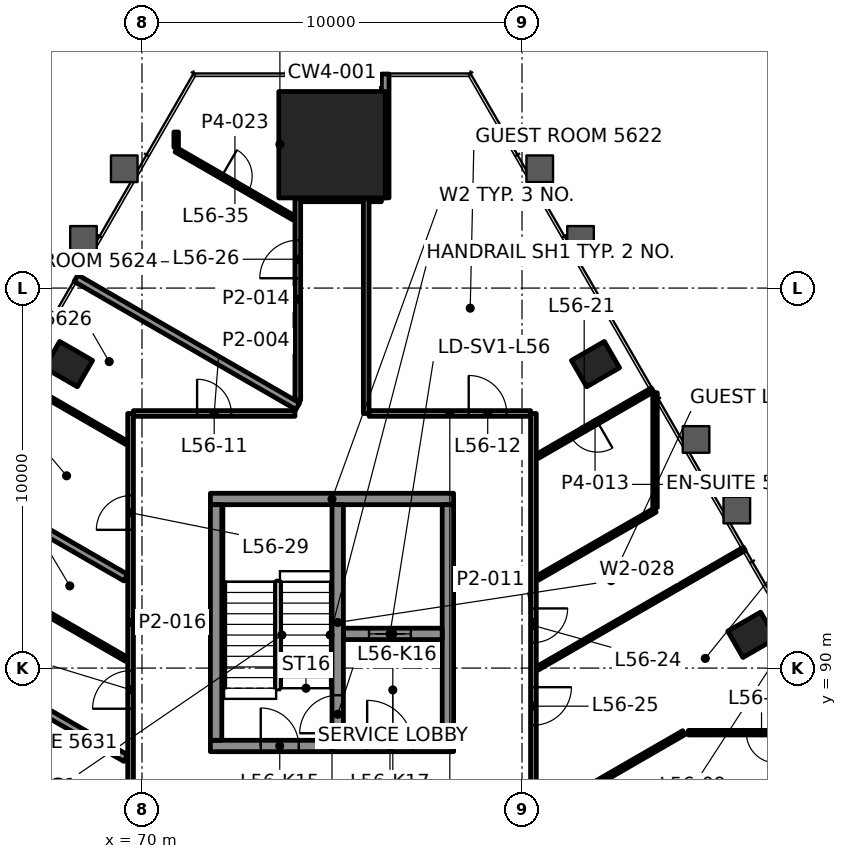
"""IFC4 building model, lengths in metres.
Left out: names, types, materials, properties, quantities, classifications, styles, units other than length and angle.
Written with IfcOpenShell. Run it as: python <this file> out.ifc"""

import sys

from ifc_helpers import new_model, si_unit, direction, frame, frame_2d, origin, origin_2d, place, context, subcontext, project, spatial, rectangle, hollow_rectangle, extrude, element, fill, save


model = new_model("IFC4")
c1 = context("Model", 3, precision=1e-05, world=origin(), true_north=direction((0.0, 1.0)))
c2 = subcontext(c1, "Body", "Model", "MODEL_VIEW")
j1 = project(units=[si_unit("LENGTHUNIT", "METRE"), si_unit("PLANEANGLEUNIT", "RADIAN")], contexts=[c1])
p1 = place(None, origin())
s1 = spatial("IfcSite", under=j1, at=p1, CompositionType="ELEMENT")
p2 = place(p1, origin())
s2 = spatial("IfcBuilding", under=s1, at=p2, CompositionType="ELEMENT")
p3 = place(p2, frame((0.0, 0.0, 237.7)))
s3 = spatial("IfcBuildingStorey", under=s2, at=p3, CompositionType="ELEMENT", Elevation=237.7)
p4 = place(p3, frame((75.0, 103.773, 0.0), z_axis=(0.0, 0.0, 1.0), x_axis=(-1.0, 0.0, 0.0)))
e1 = element("IfcColumn", 1, at=p4, inside=s3, PredefinedType="COLUMN", context=c2, shape_type="SweptSolid", body=[
    extrude(rectangle(XDim=2.8, YDim=2.8, at=origin_2d()), origin(), (0.0, 0.0, 1.0), 3.9),
])
for number, where, z_axis, x_axis in (
    (2, (86.046, 90.875, -0.0), (0.0, 0.0, 1.0), (-0.5, 0.866, 0.0)),
    (3, (81.933, 97.999, -0.0), (0.0, 0.0, 1.0), (-0.5, 0.866, 0.0)),
    (4, (68.067, 97.999, -0.0), (0.0, 0.0, 1.0), (-0.5, -0.866, 0.0)),
):
    element("IfcColumn", number, at=place(p3, frame(where, z_axis=z_axis, x_axis=x_axis)), inside=s3, PredefinedType="COLUMN", context=c2, shape_type="SweptSolid", body=[
        extrude(hollow_rectangle(XDim=0.8, YDim=1.0, WallThickness=0.05, at=origin_2d()), origin(), (0.0, 0.0, 1.0), 3.9),
    ])
p5 = place(p3, frame((71.8, 87.95, 0.0), z_axis=(0.0, 0.0, 1.0), x_axis=(1.0, 0.0, 0.0)))
e5 = element("IfcWall", 5, at=p5, inside=s3, PredefinedType="SHEAR", context=c2, shape_type="SweptSolid", body=[
    extrude(rectangle(XDim=6.4, YDim=0.3, at=frame_2d((3.2, 0.0))), origin(), (0.0, 0.0, 1.0), 3.6),
])
p6 = place(p5, frame((1.325, 0.0, 0.0)))
e6 = element("IfcOpeningElement", 6, at=p6, cuts=e5, PredefinedType="OPENING", context=c2, shape_type="SweptSolid", body=[
    extrude(rectangle(XDim=1.0, YDim=2.1, at=frame_2d((0.5, 1.05))), frame((0.0, 0.16, 0.0), z_axis=(0.0, -1.0, 0.0), x_axis=(1.0, 0.0, 0.0)), (0.0, 0.0, 1.0), 0.32),
])
p7 = place(p5, frame((4.125, 0.0, 0.0)))
e7 = element("IfcOpeningElement", 7, at=p7, cuts=e5, PredefinedType="OPENING", context=c2, shape_type="SweptSolid", body=[
    extrude(rectangle(XDim=1.2, YDim=2.1, at=frame_2d((0.6, 1.05))), frame((0.0, 0.16, 0.0), z_axis=(0.0, -1.0, 0.0), x_axis=(1.0, 0.0, 0.0)), (0.0, 0.0, 1.0), 0.32),
])
p8 = place(p3, frame((71.8, 94.45, 0.0), z_axis=(0.0, 0.0, 1.0), x_axis=(1.0, 0.0, 0.0)))
e8 = element("IfcWall", 8, at=p8, inside=s3, PredefinedType="SHEAR", context=c2, shape_type="SweptSolid", body=[
    extrude(rectangle(XDim=6.4, YDim=0.3, at=frame_2d((3.2, 0.0))), origin(), (0.0, 0.0, 1.0), 3.6),
])
for number, where, z_axis, x_axis in (
    (9, (71.95, 88.1, 0.0), (0.0, 0.0, 1.0), (0.0, 1.0, 0.0)),
    (10, (78.05, 88.1, 0.0), (0.0, 0.0, 1.0), (0.0, 1.0, 0.0)),
):
    element("IfcWall", number, at=place(p3, frame(where, z_axis=z_axis, x_axis=x_axis)), inside=s3, PredefinedType="SHEAR", context=c2, shape_type="SweptSolid", body=[
        extrude(rectangle(XDim=6.2, YDim=0.3, at=frame_2d((3.1, 0.0))), origin(), (0.0, 0.0, 1.0), 3.6),
    ])
p9 = place(p3, frame((75.3, 90.9, 0.0), z_axis=(0.0, 0.0, 1.0), x_axis=(1.0, 0.0, 0.0)))
e11 = element("IfcWall", 11, at=p9, inside=s3, PredefinedType="SHEAR", context=c2, shape_type="SweptSolid", body=[
    extrude(rectangle(XDim=2.6, YDim=0.3, at=frame_2d((1.3, 0.0))), origin(), (0.0, 0.0, 1.0), 3.6),
])
p10 = place(p9, frame((0.675, 0.0, 0.0)))
e12 = element("IfcOpeningElement", 12, at=p10, cuts=e11, PredefinedType="OPENING", context=c2, shape_type="SweptSolid", body=[
    extrude(rectangle(XDim=1.1, YDim=2.1, at=frame_2d((0.55, 1.05))), frame((0.0, 0.16, 0.0), z_axis=(0.0, -1.0, 0.0), x_axis=(1.0, 0.0, 0.0)), (0.0, 0.0, 1.0), 0.32),
])
p11 = place(p3, frame((75.15, 88.1, 0.0), z_axis=(0.0, 0.0, 1.0), x_axis=(0.0, 1.0, 0.0)))
e13 = element("IfcWall", 13, at=p11, inside=s3, PredefinedType="SHEAR", context=c2, shape_type="SweptSolid", body=[
    extrude(rectangle(XDim=6.2, YDim=0.3, at=frame_2d((3.1, 0.0))), origin(), (0.0, 0.0, 1.0), 3.6),
])
p12 = place(p11, frame((0.185, 0.0, 0.0)))
e14 = element("IfcOpeningElement", 14, at=p12, cuts=e13, PredefinedType="OPENING", context=c2, shape_type="SweptSolid", body=[
    extrude(rectangle(XDim=1.0, YDim=2.1, at=frame_2d((0.5, 1.05))), frame((0.0, 0.16, 0.0), z_axis=(0.0, -1.0, 0.0), x_axis=(1.0, 0.0, 0.0)), (0.0, 0.0, 1.0), 0.32),
])
p13 = place(p3, frame((88.642, 88.3, 0.0), z_axis=(0.0, 0.0, 1.0), x_axis=(-1.0, 0.0, 0.0)))
e15 = element("IfcWall", 15, at=p13, inside=s3, PredefinedType="PARTITIONING", context=c2, shape_type="SweptSolid", body=[
    extrude(rectangle(XDim=4.263, YDim=0.12, at=frame_2d((2.132, 0.0))), origin(), (0.0, 0.0, 1.0), 2.922),
])
p14 = place(p13, frame((1.939, 0.0, 0.0)))
e16 = element("IfcOpeningElement", 16, at=p14, cuts=e15, PredefinedType="OPENING", context=c2, shape_type="SweptSolid", body=[
    extrude(rectangle(XDim=0.8, YDim=2.1, at=frame_2d((0.4, 1.05))), frame((0.0, 0.07, 0.0), z_axis=(0.0, -1.0, 0.0), x_axis=(1.0, 0.0, 0.0)), (0.0, 0.0, 1.0), 0.14),
])
p15 = place(p3, frame((69.775, 96.7, 0.0), z_axis=(0.0, 0.0, 1.0), x_axis=(1.0, 0.0, 0.0)))
e17 = element("IfcWall", 17, at=p15, inside=s3, PredefinedType="PARTITIONING", context=c2, shape_type="SweptSolid", body=[
    extrude(rectangle(XDim=4.25, YDim=0.15, at=frame_2d((2.125, 0.0))), origin(), (0.0, 0.0, 1.0), 3.0),
])
p16 = place(p15, frame((1.675, 0.0, 0.0)))
e18 = element("IfcOpeningElement", 18, at=p16, cuts=e17, PredefinedType="OPENING", context=c2, shape_type="SweptSolid", body=[
    extrude(rectangle(XDim=0.9, YDim=2.1, at=frame_2d((0.45, 1.05))), frame((0.0, 0.085, 0.0), z_axis=(0.0, -1.0, 0.0), x_axis=(1.0, 0.0, 0.0)), (0.0, 0.0, 1.0), 0.17),
])
p17 = place(p3, frame((75.975, 96.7, 0.0), z_axis=(0.0, 0.0, 1.0), x_axis=(1.0, 0.0, 0.0)))
e19 = element("IfcWall", 19, at=p17, inside=s3, PredefinedType="PARTITIONING", context=c2, shape_type="SweptSolid", body=[
    extrude(rectangle(XDim=4.25, YDim=0.15, at=frame_2d((2.125, 0.0))), origin(), (0.0, 0.0, 1.0), 3.0),
])
p18 = place(p17, frame((2.622, 0.0, 0.0)))
e20 = element("IfcOpeningElement", 20, at=p18, cuts=e19, PredefinedType="OPENING", context=c2, shape_type="SweptSolid", body=[
    extrude(rectangle(XDim=1.0, YDim=2.1, at=frame_2d((0.5, 1.05))), frame((0.0, 0.085, 0.0), z_axis=(0.0, -1.0, 0.0), x_axis=(1.0, 0.0, 0.0)), (0.0, 0.0, 1.0), 0.17),
])
p19 = place(p3, frame((74.176, 102.373, 0.0), z_axis=(0.0, 0.0, 1.0), x_axis=(1.0, 0.0, 0.0)))
e21 = element("IfcWall", 21, at=p19, inside=s3, PredefinedType="PARTITIONING", context=c2, shape_type="SweptSolid", body=[
    extrude(rectangle(XDim=1.649, YDim=0.2, at=frame_2d((0.825, 0.0))), origin(), (0.0, 0.0, 1.0), 2.997),
])
p20 = place(p3, frame((84.493, 85.23, 0.0), z_axis=(0.0, 0.0, 1.0), x_axis=(0.866034146242, 0.499984857314, 0.0)))
e22 = element("IfcWall", 22, at=p20, inside=s3, PredefinedType="PARTITIONING", context=c2, shape_type="SweptSolid", body=[
    extrude(rectangle(XDim=5.128, YDim=0.12, at=frame_2d((2.564, 0.0))), origin(), (0.0, 0.0, 1.0), 2.922),
])
p21 = place(p3, frame((80.41, 86.078, 0.0), z_axis=(0.0, 0.0, 1.0), x_axis=(0.866033721197, 0.499985593543, 0.0)))
e23 = element("IfcWall", 23, at=p21, inside=s3, PredefinedType="PARTITIONING", context=c2, shape_type="SweptSolid", body=[
    extrude(rectangle(XDim=4.444, YDim=0.12, at=frame_2d((2.222, 0.0))), origin(), (0.0, 0.0, 1.0), 3.0),
])
p22 = place(p3, frame((80.401, 89.991, 0.0), z_axis=(0.0, 0.0, 1.0), x_axis=(0.86602790099, 0.499995674689, 0.0)))
e24 = element("IfcWall", 24, at=p22, inside=s3, PredefinedType="PARTITIONING", context=c2, shape_type="SweptSolid", body=[
    extrude(rectangle(XDim=6.291, YDim=0.1, at=frame_2d((3.146, 0.0))), origin(), (0.0, 0.0, 1.0), 2.922),
])
p23 = place(p3, frame((80.41, 92.37, 0.0), z_axis=(0.0, 0.0, 1.0), x_axis=(0.866028357664, 0.499994883695, 0.0)))
e25 = element("IfcWall", 25, at=p23, inside=s3, PredefinedType="PARTITIONING", context=c2, shape_type="SweptSolid", body=[
    extrude(rectangle(XDim=3.568, YDim=0.12, at=frame_2d((1.784, 0.0))), origin(), (0.0, 0.0, 1.0), 3.0),
])
p24 = place(p3, frame((83.433, 97.321, 0.0), z_axis=(0.0, 0.0, 1.0), x_axis=(-0.866022549299, -0.50000494408, 0.0)))
e26 = element("IfcWall", 26, at=p24, inside=s3, PredefinedType="PARTITIONING", context=c2, shape_type="SweptSolid", body=[
    extrude(rectangle(XDim=3.491, YDim=0.12, at=frame_2d((1.746, 0.0))), origin(), (0.0, 0.0, 1.0), 2.922),
])
p25 = place(p24, frame((1.676, 0.0, 0.0)))
e27 = element("IfcOpeningElement", 27, at=p25, cuts=e26, PredefinedType="OPENING", context=c2, shape_type="SweptSolid", body=[
    extrude(rectangle(XDim=0.8, YDim=2.1, at=frame_2d((0.4, 1.05))), frame((0.0, 0.07, 0.0), z_axis=(0.0, -1.0, 0.0), x_axis=(1.0, 0.0, 0.0)), (0.0, 0.0, 1.0), 0.14),
])
p26 = place(p3, frame((83.5, 94.224, 0.0), z_axis=(0.0, 0.0, 1.0), x_axis=(0.0, 1.0, 0.0)))
e28 = element("IfcWall", 28, at=p26, inside=s3, PredefinedType="PARTITIONING", context=c2, shape_type="SweptSolid", body=[
    extrude(rectangle(XDim=3.022, YDim=0.12, at=frame_2d((1.511, 0.0))), origin(), (0.0, 0.0, 1.0), 2.922),
])
p27 = place(p3, frame((80.3, 96.699, 0.0), z_axis=(0.0, 0.0, 1.0), x_axis=(0.0, -1.0, 0.0)))
e29 = element("IfcWall", 29, at=p27, inside=s3, PredefinedType="PARTITIONING", context=c2, shape_type="SweptSolid", body=[
    extrude(rectangle(XDim=10.999, YDim=0.15, at=frame_2d((5.5, 0.0))), origin(), (0.0, 0.0, 1.0), 3.0),
])
p28 = place(p27, frame((5.129, 0.0, 0.0)))
e30 = element("IfcOpeningElement", 30, at=p28, cuts=e29, PredefinedType="OPENING", context=c2, shape_type="SweptSolid", body=[
    extrude(rectangle(XDim=0.9, YDim=2.1, at=frame_2d((0.45, 1.05))), frame((0.0, 0.085, 0.0), z_axis=(0.0, -1.0, 0.0), x_axis=(1.0, 0.0, 0.0)), (0.0, 0.0, 1.0), 0.17),
])
p29 = place(p27, frame((7.202, 0.0, 0.0)))
e31 = element("IfcOpeningElement", 31, at=p29, cuts=e29, PredefinedType="OPENING", context=c2, shape_type="SweptSolid", body=[
    extrude(rectangle(XDim=1.0, YDim=2.1, at=frame_2d((0.5, 1.05))), frame((0.0, 0.085, 0.0), z_axis=(0.0, -1.0, 0.0), x_axis=(1.0, 0.0, 0.0)), (0.0, 0.0, 1.0), 0.17),
])
p30 = place(p3, frame((76.4, 102.373, 0.0), z_axis=(0.0, 0.0, 1.0), x_axis=(0.0, 1.0, 0.0)))
e32 = element("IfcWall", 32, at=p30, inside=s3, PredefinedType="PARTITIONING", context=c2, shape_type="SweptSolid", body=[
    extrude(rectangle(XDim=3.26, YDim=0.2, at=frame_2d((1.63, 0.0))), origin(), (0.0, 0.0, 1.0), 3.0),
])
p31 = place(p3, frame((75.9, 96.7, 0.0), z_axis=(0.0, 0.0, 1.0), x_axis=(0.0, 1.0, 0.0)))
e33 = element("IfcWall", 33, at=p31, inside=s3, PredefinedType="PARTITIONING", context=c2, shape_type="SweptSolid", body=[
    extrude(rectangle(XDim=5.673, YDim=0.15, at=frame_2d((2.836, 0.0))), origin(), (0.0, 0.0, 1.0), 3.0),
])
p32 = place(p3, frame((74.1, 97.05, 0.0), z_axis=(0.0, 0.0, 1.0), x_axis=(0.0, 1.0, 0.0)))
e34 = element("IfcWall", 34, at=p32, inside=s3, PredefinedType="PARTITIONING", context=c2, shape_type="SweptSolid", body=[
    extrude(rectangle(XDim=5.322, YDim=0.15, at=frame_2d((2.661, 0.0))), origin(), (0.0, 0.0, 1.0), 3.0),
])
p33 = place(p32, frame((3.209, 0.0, 0.0)))
e35 = element("IfcOpeningElement", 35, at=p33, cuts=e34, PredefinedType="OPENING", context=c2, shape_type="SweptSolid", body=[
    extrude(rectangle(XDim=1.0, YDim=2.1, at=frame_2d((0.5, 1.05))), frame((0.0, 0.085, 0.0), z_axis=(0.0, -1.0, 0.0), x_axis=(1.0, 0.0, 0.0)), (0.0, 0.0, 1.0), 0.17),
])
p34 = place(p3, frame((70.9, 103.703, 0.0), z_axis=(0.0, 0.0, 1.0), x_axis=(0.0, 1.0, 0.0)))
e36 = element("IfcWall", 36, at=p34, inside=s3, PredefinedType="PARTITIONING", context=c2, shape_type="SweptSolid", body=[
    extrude(rectangle(XDim=0.403, YDim=0.12, at=frame_2d((0.202, 0.0))), origin(), (0.0, 0.0, 1.0), 3.0),
])
p35 = place(p3, frame((69.7, 85.7, 0.0), z_axis=(0.0, 0.0, 1.0), x_axis=(0.0, 1.0, 0.0)))
e37 = element("IfcWall", 37, at=p35, inside=s3, PredefinedType="PARTITIONING", context=c2, shape_type="SweptSolid", body=[
    extrude(rectangle(XDim=10.999, YDim=0.15, at=frame_2d((5.5, 0.0))), origin(), (0.0, 0.0, 1.0), 3.0),
])
p36 = place(p35, frame((3.23, 0.0, 0.0)))
e38 = element("IfcOpeningElement", 38, at=p36, cuts=e37, PredefinedType="OPENING", context=c2, shape_type="SweptSolid", body=[
    extrude(rectangle(XDim=1.0, YDim=2.1, at=frame_2d((0.5, 1.05))), frame((0.0, 0.085, 0.0), z_axis=(0.0, -1.0, 0.0), x_axis=(1.0, 0.0, 0.0)), (0.0, 0.0, 1.0), 0.17),
])
p37 = place(p35, frame((7.938, 0.0, 0.0)))
e39 = element("IfcOpeningElement", 39, at=p37, cuts=e37, PredefinedType="OPENING", context=c2, shape_type="SweptSolid", body=[
    extrude(rectangle(XDim=0.9, YDim=2.1, at=frame_2d((0.45, 1.05))), frame((0.0, 0.085, 0.0), z_axis=(0.0, -1.0, 0.0), x_axis=(1.0, 0.0, 0.0)), (0.0, 0.0, 1.0), 0.17),
])
p38 = place(p3, frame((70.9, 103.634, 0.0), z_axis=(0.0, 0.0, 1.0), x_axis=(0.866028357664, -0.499994883695, 0.0)))
e40 = element("IfcWall", 40, at=p38, inside=s3, PredefinedType="PARTITIONING", context=c2, shape_type="SweptSolid", body=[
    extrude(rectangle(XDim=3.568, YDim=0.12, at=frame_2d((1.784, 0.0))), origin(), (0.0, 0.0, 1.0), 3.0),
])
p39 = place(p38, frame((1.384, 0.0, 0.0)))
e41 = element("IfcOpeningElement", 41, at=p39, cuts=e40, PredefinedType="OPENING", context=c2, shape_type="SweptSolid", body=[
    extrude(rectangle(XDim=0.8, YDim=2.1, at=frame_2d((0.4, 1.05))), frame((0.0, 0.07, 0.0), z_axis=(0.0, -1.0, 0.0), x_axis=(1.0, 0.0, 0.0)), (0.0, 0.0, 1.0), 0.14),
])
p40 = place(p3, frame((74.1, 96.89, 0.0), z_axis=(0.0, 0.0, 1.0), x_axis=(-0.866036585879, 0.499980631543, 0.0)))
e42 = element("IfcWall", 42, at=p40, inside=s3, PredefinedType="PARTITIONING", context=c2, shape_type="SweptSolid", body=[
    extrude(rectangle(XDim=6.74, YDim=0.2, at=frame_2d((3.37, 0.0))), origin(), (0.0, 0.0, 1.0), 3.0),
])
p41 = place(p3, frame((69.599, 95.927, 0.0), z_axis=(0.0, 0.0, 1.0), x_axis=(-0.866019199568, 0.500010745865, 0.0)))
e43 = element("IfcWall", 43, at=p41, inside=s3, PredefinedType="PARTITIONING", context=c2, shape_type="SweptSolid", body=[
    extrude(rectangle(XDim=3.323, YDim=0.1, at=frame_2d((1.662, 0.0))), origin(), (0.0, 0.0, 1.0), 2.922),
])
p42 = place(p3, frame((69.573, 92.38, 0.0), z_axis=(0.0, 0.0, 1.0), x_axis=(-0.866020331166, 0.500008785931, 0.0)))
e44 = element("IfcWall", 44, at=p42, inside=s3, PredefinedType="PARTITIONING", context=c2, shape_type="SweptSolid", body=[
    extrude(rectangle(XDim=4.01, YDim=0.2, at=frame_2d((2.005, 0.0))), origin(), (0.0, 0.0, 1.0), 2.922),
])
p43 = place(p3, frame((69.59, 90.233, 0.0), z_axis=(0.0, 0.0, 1.0), x_axis=(-0.866028357664, 0.499994883695, 0.0)))
e45 = element("IfcWall", 45, at=p43, inside=s3, PredefinedType="PARTITIONING", context=c2, shape_type="SweptSolid", body=[
    extrude(rectangle(XDim=3.568, YDim=0.12, at=frame_2d((1.784, 0.0))), origin(), (0.0, 0.0, 1.0), 3.0),
])
p44 = place(p3, frame((69.573, 87.631, 0.0), z_axis=(0.0, 0.0, 1.0), x_axis=(-0.866028616566, 0.499994435258, 0.0)))
e46 = element("IfcWall", 46, at=p44, inside=s3, PredefinedType="PARTITIONING", context=c2, shape_type="SweptSolid", body=[
    extrude(rectangle(XDim=3.548, YDim=0.2, at=frame_2d((1.774, 0.0))), origin(), (0.0, 0.0, 1.0), 3.0),
])
p45 = place(p3, frame((75.975, 102.373, 0.0), z_axis=(0.0, 0.0, 1.0), x_axis=(1.0, 0.0, 0.0)))
e47 = element("IfcWall", 47, at=p45, inside=s3, PredefinedType="PARTITIONING", context=c2, shape_type="SweptSolid", body=[
    extrude(rectangle(XDim=0.324, YDim=0.2, at=frame_2d((0.162, 0.0))), origin(), (0.0, 0.0, 1.0), 3.0),
])
p46 = place(p14, origin())
e48 = element("IfcDoor", 48, at=p46, inside=s3, OperationType="SINGLE_SWING_RIGHT", PredefinedType="DOOR", context=c2, shape_type="SweptSolid", body=[
    extrude(rectangle(XDim=0.8, YDim=2.1, at=frame_2d((0.4, 1.05))), frame((0.0, 0.025, 0.0), z_axis=(0.0, -1.0, 0.0), x_axis=(1.0, 0.0, 0.0)), (0.0, 0.0, 1.0), 0.05),
])
fill(e16, e48)
p47 = place(p16, origin())
e49 = element("IfcDoor", 49, at=p47, inside=s3, OperationType="SINGLE_SWING_LEFT", PredefinedType="DOOR", context=c2, shape_type="SweptSolid", body=[
    extrude(rectangle(XDim=0.9, YDim=2.1, at=frame_2d((0.45, 1.05))), frame((0.0, 0.025, 0.0), z_axis=(0.0, -1.0, 0.0), x_axis=(1.0, 0.0, 0.0)), (0.0, 0.0, 1.0), 0.05),
])
fill(e18, e49)
p48 = place(p18, origin())
e50 = element("IfcDoor", 50, at=p48, inside=s3, OperationType="SINGLE_SWING_LEFT", PredefinedType="DOOR", context=c2, shape_type="SweptSolid", body=[
    extrude(rectangle(XDim=1.0, YDim=2.1, at=frame_2d((0.5, 1.05))), frame((0.0, 0.025, 0.0), z_axis=(0.0, -1.0, 0.0), x_axis=(1.0, 0.0, 0.0)), (0.0, 0.0, 1.0), 0.05),
])
fill(e20, e50)
p49 = place(p25, origin())
e51 = element("IfcDoor", 51, at=p49, inside=s3, OperationType="SINGLE_SWING_LEFT", PredefinedType="DOOR", context=c2, shape_type="SweptSolid", body=[
    extrude(rectangle(XDim=0.8, YDim=2.1, at=frame_2d((0.4, 1.05))), frame((0.0, 0.025, 0.0), z_axis=(0.0, -1.0, 0.0), x_axis=(1.0, 0.0, 0.0)), (0.0, 0.0, 1.0), 0.05),
])
fill(e27, e51)
p50 = place(p28, origin())
e52 = element("IfcDoor", 52, at=p50, inside=s3, OperationType="SINGLE_SWING_LEFT", PredefinedType="DOOR", context=c2, shape_type="SweptSolid", body=[
    extrude(rectangle(XDim=0.9, YDim=2.1, at=frame_2d((0.45, 1.05))), frame((0.0, 0.025, 0.0), z_axis=(0.0, -1.0, 0.0), x_axis=(1.0, 0.0, 0.0)), (0.0, 0.0, 1.0), 0.05),
])
fill(e30, e52)
p51 = place(p29, origin())
e53 = element("IfcDoor", 53, at=p51, inside=s3, OperationType="SINGLE_SWING_LEFT", PredefinedType="DOOR", context=c2, shape_type="SweptSolid", body=[
    extrude(rectangle(XDim=1.0, YDim=2.1, at=frame_2d((0.5, 1.05))), frame((0.0, 0.025, 0.0), z_axis=(0.0, -1.0, 0.0), x_axis=(1.0, 0.0, 0.0)), (0.0, 0.0, 1.0), 0.05),
])
fill(e31, e53)
p52 = place(p33, origin())
e54 = element("IfcDoor", 54, at=p52, inside=s3, OperationType="SINGLE_SWING_LEFT", PredefinedType="DOOR", context=c2, shape_type="SweptSolid", body=[
    extrude(rectangle(XDim=1.0, YDim=2.1, at=frame_2d((0.5, 1.05))), frame((0.0, 0.025, 0.0), z_axis=(0.0, -1.0, 0.0), x_axis=(1.0, 0.0, 0.0)), (0.0, 0.0, 1.0), 0.05),
])
fill(e35, e54)
p53 = place(p36, origin())
e55 = element("IfcDoor", 55, at=p53, inside=s3, OperationType="SINGLE_SWING_LEFT", PredefinedType="DOOR", context=c2, shape_type="SweptSolid", body=[
    extrude(rectangle(XDim=1.0, YDim=2.1, at=frame_2d((0.5, 1.05))), frame((0.0, 0.025, 0.0), z_axis=(0.0, -1.0, 0.0), x_axis=(1.0, 0.0, 0.0)), (0.0, 0.0, 1.0), 0.05),
])
fill(e38, e55)
p54 = place(p37, origin())
e56 = element("IfcDoor", 56, at=p54, inside=s3, OperationType="SINGLE_SWING_RIGHT", PredefinedType="DOOR", context=c2, shape_type="SweptSolid", body=[
    extrude(rectangle(XDim=0.9, YDim=2.1, at=frame_2d((0.45, 1.05))), frame((0.0, 0.025, 0.0), z_axis=(0.0, -1.0, 0.0), x_axis=(1.0, 0.0, 0.0)), (0.0, 0.0, 1.0), 0.05),
])
fill(e39, e56)
p55 = place(p39, origin())
e57 = element("IfcDoor", 57, at=p55, inside=s3, OperationType="SINGLE_SWING_LEFT", PredefinedType="DOOR", context=c2, shape_type="SweptSolid", body=[
    extrude(rectangle(XDim=0.8, YDim=2.1, at=frame_2d((0.4, 1.05))), frame((0.0, 0.025, 0.0), z_axis=(0.0, -1.0, 0.0), x_axis=(1.0, 0.0, 0.0)), (0.0, 0.0, 1.0), 0.05),
])
fill(e41, e57)
p56 = place(p10, origin())
e58 = element("IfcDoor", 58, at=p56, inside=s3, OperationType="DOUBLE_DOOR_SLIDING", PredefinedType="DOOR", context=c2, shape_type="SweptSolid", body=[
    extrude(rectangle(XDim=1.1, YDim=2.1, at=frame_2d((0.55, 1.05))), frame((0.0, 0.025, 0.0), z_axis=(0.0, -1.0, 0.0), x_axis=(1.0, 0.0, 0.0)), (0.0, 0.0, 1.0), 0.05),
])
fill(e12, e58)
p57 = place(p6, origin())
e59 = element("IfcDoor", 59, at=p57, inside=s3, OperationType="SINGLE_SWING_RIGHT", PredefinedType="DOOR", context=c2, shape_type="SweptSolid", body=[
    extrude(rectangle(XDim=1.0, YDim=2.1, at=frame_2d((0.5, 1.05))), frame((0.0, 0.025, 0.0), z_axis=(0.0, -1.0, 0.0), x_axis=(1.0, 0.0, 0.0)), (0.0, 0.0, 1.0), 0.05),
])
fill(e6, e59)
p58 = place(p12, origin())
e60 = element("IfcDoor", 60, at=p58, inside=s3, OperationType="SINGLE_SWING_LEFT", PredefinedType="DOOR", context=c2, shape_type="SweptSolid", body=[
    extrude(rectangle(XDim=1.0, YDim=2.1, at=frame_2d((0.5, 1.05))), frame((0.0, 0.025, 0.0), z_axis=(0.0, -1.0, 0.0), x_axis=(1.0, 0.0, 0.0)), (0.0, 0.0, 1.0), 0.05),
])
fill(e14, e60)
p59 = place(p7, origin())
e61 = element("IfcDoor", 61, at=p59, inside=s3, OperationType="SINGLE_SWING_RIGHT", PredefinedType="DOOR", context=c2, shape_type="SweptSolid", body=[
    extrude(rectangle(XDim=1.2, YDim=2.1, at=frame_2d((0.6, 1.05))), frame((0.0, 0.025, 0.0), z_axis=(0.0, -1.0, 0.0), x_axis=(1.0, 0.0, 0.0)), (0.0, 0.0, 1.0), 0.05),
])
fill(e7, e61)
save(model, sys.argv[1])
